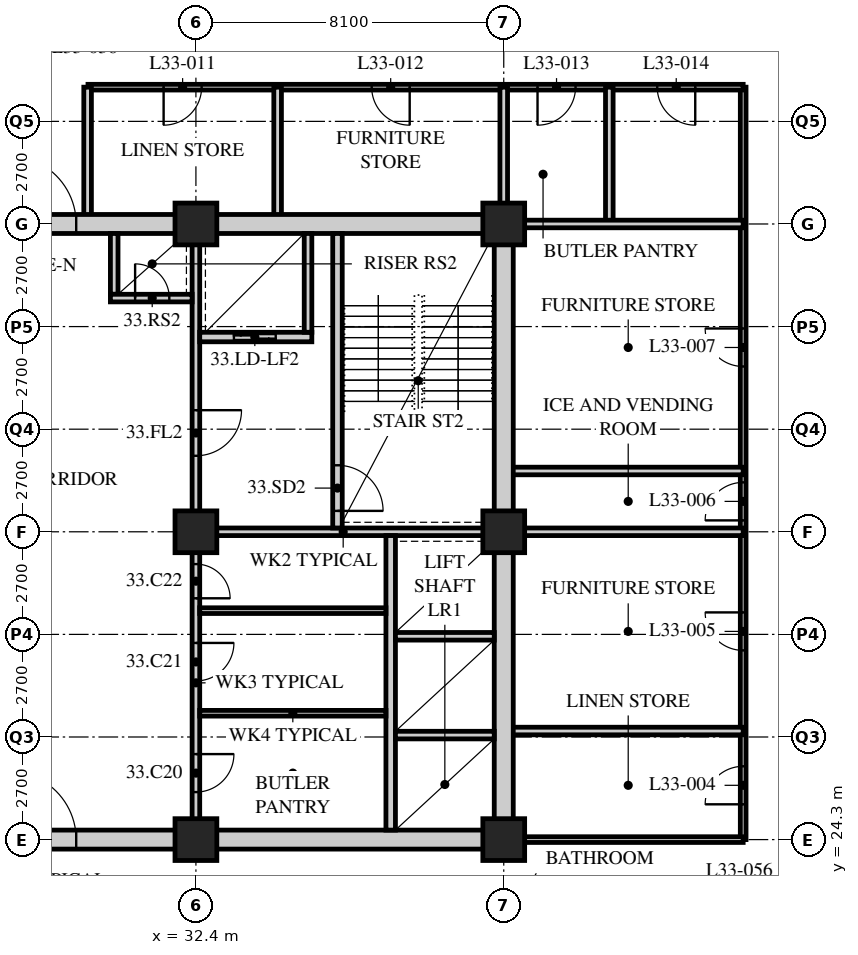
"""IFC4 building model, lengths in metres.
Left out: names, types, materials, properties, quantities, classifications, styles, units other than length and angle.
Written with IfcOpenShell. Run it as: python <this file> out.ifc"""

import sys

from ifc_helpers import new_model, si_unit, direction, frame, frame_2d, origin, origin_2d, place, context, subcontext, project, spatial, rectangle, hollow_rectangle, extrude, element, fill, save


model = new_model("IFC4")
c1 = context("Model", 3, precision=1e-05, world=origin(), true_north=direction((0.0, 1.0)))
c2 = subcontext(c1, "Body", "Model", "MODEL_VIEW")
j1 = project(units=[si_unit("LENGTHUNIT", "METRE"), si_unit("PLANEANGLEUNIT", "RADIAN")], contexts=[c1])
p1 = place(None, origin())
s1 = spatial("IfcSite", under=j1, at=p1, CompositionType="ELEMENT")
p2 = place(p1, origin())
s2 = spatial("IfcBuilding", under=s1, at=p2, CompositionType="ELEMENT")
p3 = place(p2, frame((0.0, 0.0, 130.6)))
s3 = spatial("IfcBuildingStorey", under=s2, at=p3, CompositionType="ELEMENT", Elevation=130.6)
for number, where, z_axis, x_axis in (
    (1, (32.4, 24.3, 0.0), (0.0, 0.0, 1.0), (1.0, 0.0, 0.0)),
    (2, (32.4, 32.4, 0.0), (0.0, 0.0, 1.0), (1.0, 0.0, 0.0)),
    (3, (32.4, 40.5, 0.0), (0.0, 0.0, 1.0), (1.0, 0.0, 0.0)),
    (4, (40.5, 24.3, 0.0), (0.0, 0.0, 1.0), (1.0, 0.0, 0.0)),
    (5, (40.5, 32.4, 0.0), (0.0, 0.0, 1.0), (1.0, 0.0, 0.0)),
    (6, (40.5, 40.5, 0.0), (0.0, 0.0, 1.0), (1.0, 0.0, 0.0)),
):
    element("IfcColumn", number, at=place(p3, frame(where, z_axis=z_axis, x_axis=x_axis)), inside=s3, PredefinedType="COLUMN", context=c2, shape_type="SweptSolid", body=[
        extrude(hollow_rectangle(XDim=1.1, YDim=1.1, WallThickness=0.1, at=origin_2d()), origin(), (0.0, 0.0, 1.0), 3.4),
    ])
p4 = place(p3, frame((46.8, 24.3, 0.0), z_axis=(0.0, 0.0, 1.0), x_axis=(0.0, 1.0, 0.0)))
e7 = element("IfcWall", 7, at=p4, inside=s3, PredefinedType="PARTITIONING", context=c2, shape_type="SweptSolid", body=[
    extrude(rectangle(XDim=19.8, YDim=0.15, at=frame_2d((9.9, 0.0))), origin(), (0.0, 0.0, 1.0), 3.19),
])
p5 = place(p4, frame((0.929, 0.0, 0.0)))
e8 = element("IfcOpeningElement", 8, at=p5, cuts=e7, PredefinedType="OPENING", context=c2, shape_type="SweptSolid", body=[
    extrude(rectangle(XDim=1.0, YDim=2.1, at=frame_2d((0.5, 1.05))), frame((0.0, 0.085, 0.0), z_axis=(0.0, -1.0, 0.0), x_axis=(1.0, 0.0, 0.0)), (0.0, 0.0, 1.0), 0.17),
])
p6 = place(p4, frame((4.979, 0.0, 0.0)))
e9 = element("IfcOpeningElement", 9, at=p6, cuts=e7, PredefinedType="OPENING", context=c2, shape_type="SweptSolid", body=[
    extrude(rectangle(XDim=1.0, YDim=2.1, at=frame_2d((0.5, 1.05))), frame((0.0, 0.085, 0.0), z_axis=(0.0, -1.0, 0.0), x_axis=(1.0, 0.0, 0.0)), (0.0, 0.0, 1.0), 0.17),
])
p7 = place(p4, frame((8.4, 0.0, 0.0)))
e10 = element("IfcOpeningElement", 10, at=p7, cuts=e7, PredefinedType="OPENING", context=c2, shape_type="SweptSolid", body=[
    extrude(rectangle(XDim=1.0, YDim=2.1, at=frame_2d((0.5, 1.05))), frame((0.0, 0.085, 0.0), z_axis=(0.0, -1.0, 0.0), x_axis=(1.0, 0.0, 0.0)), (0.0, 0.0, 1.0), 0.17),
])
p8 = place(p4, frame((12.45, 0.0, 0.0)))
e11 = element("IfcOpeningElement", 11, at=p8, cuts=e7, PredefinedType="OPENING", context=c2, shape_type="SweptSolid", body=[
    extrude(rectangle(XDim=1.0, YDim=2.1, at=frame_2d((0.5, 1.05))), frame((0.0, 0.085, 0.0), z_axis=(0.0, -1.0, 0.0), x_axis=(1.0, 0.0, 0.0)), (0.0, 0.0, 1.0), 0.17),
])
p9 = place(p3, frame((46.8, 44.1, 0.0), z_axis=(0.0, 0.0, 1.0), x_axis=(-1.0, 0.0, 0.0)))
e12 = element("IfcWall", 12, at=p9, inside=s3, PredefinedType="PARTITIONING", context=c2, shape_type="SweptSolid", body=[
    extrude(rectangle(XDim=17.24, YDim=0.15, at=frame_2d((8.62, 0.0))), origin(), (0.0, 0.0, 1.0), 3.19),
])
p10 = place(p9, frame((14.25, 0.0, 0.0)))
e13 = element("IfcOpeningElement", 13, at=p10, cuts=e12, PredefinedType="OPENING", context=c2, shape_type="SweptSolid", body=[
    extrude(rectangle(XDim=1.0, YDim=2.1, at=frame_2d((0.5, 1.05))), frame((0.0, 0.085, 0.0), z_axis=(0.0, -1.0, 0.0), x_axis=(1.0, 0.0, 0.0)), (0.0, 0.0, 1.0), 0.17),
])
p11 = place(p9, frame((8.775, 0.0, 0.0)))
e14 = element("IfcOpeningElement", 14, at=p11, cuts=e12, PredefinedType="OPENING", context=c2, shape_type="SweptSolid", body=[
    extrude(rectangle(XDim=1.0, YDim=2.1, at=frame_2d((0.5, 1.05))), frame((0.0, 0.085, 0.0), z_axis=(0.0, -1.0, 0.0), x_axis=(1.0, 0.0, 0.0)), (0.0, 0.0, 1.0), 0.17),
])
p12 = place(p9, frame((4.411, 0.0, 0.0)))
e15 = element("IfcOpeningElement", 15, at=p12, cuts=e12, PredefinedType="OPENING", context=c2, shape_type="SweptSolid", body=[
    extrude(rectangle(XDim=1.0, YDim=2.1, at=frame_2d((0.5, 1.05))), frame((0.0, 0.085, 0.0), z_axis=(0.0, -1.0, 0.0), x_axis=(1.0, 0.0, 0.0)), (0.0, 0.0, 1.0), 0.17),
])
p13 = place(p9, frame((1.261, 0.0, 0.0)))
e16 = element("IfcOpeningElement", 16, at=p13, cuts=e12, PredefinedType="OPENING", context=c2, shape_type="SweptSolid", body=[
    extrude(rectangle(XDim=1.0, YDim=2.1, at=frame_2d((0.5, 1.05))), frame((0.0, 0.085, 0.0), z_axis=(0.0, -1.0, 0.0), x_axis=(1.0, 0.0, 0.0)), (0.0, 0.0, 1.0), 0.17),
])
p14 = place(p3, frame((40.7, 24.3, 0.0), z_axis=(0.0, 0.0, 1.0), x_axis=(1.0, 0.0, 0.0)))
e17 = element("IfcWall", 17, at=p14, inside=s3, PredefinedType="PARTITIONING", context=c2, shape_type="SweptSolid", body=[
    extrude(rectangle(XDim=6.1, YDim=0.15, at=frame_2d((3.05, 0.0))), origin(), (0.0, 0.0, 1.0), 3.19),
])
for number, where, z_axis, x_axis in (
    (18, (40.5, 32.4, 0.0), (0.0, 0.0, 1.0), (1.0, 0.0, 0.0)),
    (19, (46.8, 27.157, 0.0), (0.0, 0.0, 1.0), (-1.0, 0.0, 0.0)),
    (20, (46.8, 34.0, 0.0), (0.0, 0.0, 1.0), (-1.0, 0.0, 0.0)),
):
    element("IfcWall", number, at=place(p3, frame(where, z_axis=z_axis, x_axis=x_axis)), inside=s3, PredefinedType="SOLIDWALL", context=c2, shape_type="SweptSolid", body=[
        extrude(rectangle(XDim=6.3, YDim=0.2, at=frame_2d((3.15, 0.0))), origin(), (0.0, 0.0, 1.0), 3.19),
    ])
p15 = place(p3, frame((40.5, 40.5, 0.0), z_axis=(0.0, 0.0, 1.0), x_axis=(0.0, 1.0, 0.0)))
e21 = element("IfcWall", 21, at=p15, inside=s3, PredefinedType="SOLIDWALL", context=c2, shape_type="SweptSolid", body=[
    extrude(rectangle(XDim=3.6, YDim=0.2, at=frame_2d((1.8, 0.0))), origin(), (0.0, 0.0, 1.0), 2.578),
])
for number, where, z_axis, x_axis in (
    (22, (34.55, 44.1, 0.0), (0.0, 0.0, 1.0), (0.0, -1.0, 0.0)),
    (23, (43.278, 44.1, 0.0), (0.0, 0.0, 1.0), (0.0, -1.0, 0.0)),
    (24, (29.55, 40.5, 0.0), (0.0, 0.0, 1.0), (0.0, 1.0, 0.0)),
):
    element("IfcWall", number, at=place(p3, frame(where, z_axis=z_axis, x_axis=x_axis)), inside=s3, PredefinedType="SOLIDWALL", context=c2, shape_type="SweptSolid", body=[
        extrude(rectangle(XDim=3.6, YDim=0.2, at=frame_2d((1.8, 0.0))), origin(), (0.0, 0.0, 1.0), 3.19),
    ])
p16 = place(p3, frame((40.5, 40.5, 0.0), z_axis=(0.0, 0.0, 1.0), x_axis=(1.0, 0.0, 0.0)))
e25 = element("IfcWall", 25, at=p16, inside=s3, PredefinedType="SOLIDWALL", context=c2, shape_type="SweptSolid", body=[
    extrude(rectangle(XDim=6.3, YDim=0.2, at=frame_2d((3.15, 0.0))), origin(), (0.0, 0.0, 1.0), 3.19),
])
p17 = place(p3, frame((15.95, 24.3, 0.0), z_axis=(0.0, 0.0, 1.0), x_axis=(1.0, 0.0, 0.0)))
e26 = element("IfcWall", 26, at=p17, inside=s3, PredefinedType="SOLIDWALL", context=c2, shape_type="SweptSolid", body=[
    extrude(rectangle(XDim=24.8, YDim=0.5, at=frame_2d((12.4, 0.0))), origin(), (0.0, 0.0, 1.0), 2.54),
])
p18 = place(p17, frame((11.5, 0.0, 0.0)))
e27 = element("IfcOpeningElement", 27, at=p18, cuts=e26, PredefinedType="OPENING", context=c2, shape_type="SweptSolid", body=[
    extrude(rectangle(XDim=1.8, YDim=2.4, at=frame_2d((0.9, 1.2))), frame((0.0, 0.26, 0.0), z_axis=(0.0, -1.0, 0.0), x_axis=(1.0, 0.0, 0.0)), (0.0, 0.0, 1.0), 0.52),
])
p19 = place(p3, frame((15.95, 40.5, 0.0), z_axis=(0.0, 0.0, 1.0), x_axis=(1.0, 0.0, 0.0)))
e28 = element("IfcWall", 28, at=p19, inside=s3, PredefinedType="SOLIDWALL", context=c2, shape_type="SweptSolid", body=[
    extrude(rectangle(XDim=24.8, YDim=0.5, at=frame_2d((12.4, 0.0))), origin(), (0.0, 0.0, 1.0), 2.54),
])
p20 = place(p19, frame((11.5, 0.0, 0.0)))
e29 = element("IfcOpeningElement", 29, at=p20, cuts=e28, PredefinedType="OPENING", context=c2, shape_type="SweptSolid", body=[
    extrude(rectangle(XDim=1.8, YDim=2.4, at=frame_2d((0.9, 1.2))), frame((0.0, 0.26, 0.0), z_axis=(0.0, -1.0, 0.0), x_axis=(1.0, 0.0, 0.0)), (0.0, 0.0, 1.0), 0.52),
])
p21 = place(p3, frame((40.5, 24.55, 0.0), z_axis=(0.0, 0.0, 1.0), x_axis=(0.0, 1.0, 0.0)))
e30 = element("IfcWall", 30, at=p21, inside=s3, PredefinedType="SOLIDWALL", context=c2, shape_type="SweptSolid", body=[
    extrude(rectangle(XDim=15.7, YDim=0.5, at=frame_2d((7.85, 0.0))), origin(), (0.0, 0.0, 1.0), 2.578),
])
p22 = place(p3, frame((32.3, 32.4, 0.0), z_axis=(0.0, 0.0, 1.0), x_axis=(1.0, 0.0, 0.0)))
e31 = element("IfcWall", 31, at=p22, inside=s3, PredefinedType="SOLIDWALL", context=c2, shape_type="SweptSolid", body=[
    extrude(rectangle(XDim=7.95, YDim=0.2, at=frame_2d((3.975, 0.0))), origin(), (0.0, 0.0, 1.0), 2.578),
])
p23 = place(p3, frame((32.4, 32.5, 0.0), z_axis=(0.0, 0.0, 1.0), x_axis=(0.0, 1.0, 0.0)))
e32 = element("IfcWall", 32, at=p23, inside=s3, PredefinedType="SOLIDWALL", context=c2, shape_type="SweptSolid", body=[
    extrude(rectangle(XDim=7.75, YDim=0.2, at=frame_2d((3.875, 0.0))), origin(), (0.0, 0.0, 1.0), 2.578),
])
p24 = place(p23, frame((1.9, 0.0, 0.0)))
e33 = element("IfcOpeningElement", 33, at=p24, cuts=e32, PredefinedType="OPENING", context=c2, shape_type="SweptSolid", body=[
    extrude(rectangle(XDim=1.2, YDim=2.1, at=frame_2d((0.6, 1.05))), frame((0.0, 0.11, 0.0), z_axis=(0.0, -1.0, 0.0), x_axis=(1.0, 0.0, 0.0)), (0.0, 0.0, 1.0), 0.22),
])
p25 = place(p3, frame((37.525, 24.55, 0.0), z_axis=(0.0, 0.0, 1.0), x_axis=(0.0, 1.0, 0.0)))
e34 = element("IfcWall", 34, at=p25, inside=s3, PredefinedType="SOLIDWALL", context=c2, shape_type="SweptSolid", body=[
    extrude(rectangle(XDim=7.75, YDim=0.25, at=frame_2d((3.875, 0.0))), origin(), (0.0, 0.0, 1.0), 3.19),
])
for number, where, z_axis, x_axis in (
    (35, (37.65, 27.05, 0.0), (0.0, 0.0, 1.0), (1.0, 0.0, 0.0)),
    (36, (37.65, 29.65, 0.0), (0.0, 0.0, 1.0), (1.0, 0.0, 0.0)),
):
    element("IfcWall", number, at=place(p3, frame(where, z_axis=z_axis, x_axis=x_axis)), inside=s3, PredefinedType="SOLIDWALL", context=c2, shape_type="SweptSolid", body=[
        extrude(rectangle(XDim=2.6, YDim=0.2, at=frame_2d((1.3, 0.0))), origin(), (0.0, 0.0, 1.0), 3.19),
    ])
p26 = place(p3, frame((36.125, 32.5, 0.0), z_axis=(0.0, 0.0, 1.0), x_axis=(0.0, 1.0, 0.0)))
e37 = element("IfcWall", 37, at=p26, inside=s3, PredefinedType="SOLIDWALL", context=c2, shape_type="SweptSolid", body=[
    extrude(rectangle(XDim=7.75, YDim=0.25, at=frame_2d((3.875, 0.0))), origin(), (0.0, 0.0, 1.0), 3.19),
])
p27 = place(p26, frame((0.45, 0.0, 0.0)))
e38 = element("IfcOpeningElement", 38, at=p27, cuts=e37, PredefinedType="OPENING", context=c2, shape_type="SweptSolid", body=[
    extrude(rectangle(XDim=1.2, YDim=2.1, at=frame_2d((0.6, 1.05))), frame((0.0, 0.135, 0.0), z_axis=(0.0, -1.0, 0.0), x_axis=(1.0, 0.0, 0.0)), (0.0, 0.0, 1.0), 0.27),
])
p28 = place(p3, frame((32.5, 37.525, 0.0), z_axis=(0.0, 0.0, 1.0), x_axis=(1.0, 0.0, 0.0)))
e39 = element("IfcWall", 39, at=p28, inside=s3, PredefinedType="SOLIDWALL", context=c2, shape_type="SweptSolid", body=[
    extrude(rectangle(XDim=2.95, YDim=0.25, at=frame_2d((1.475, 0.0))), origin(), (0.0, 0.0, 1.0), 3.19),
])
p29 = place(p28, frame((0.9, 0.0, 0.0)))
e40 = element("IfcOpeningElement", 40, at=p29, cuts=e39, PredefinedType="OPENING", context=c2, shape_type="SweptSolid", body=[
    extrude(rectangle(XDim=1.1, YDim=2.4, at=frame_2d((0.55, 1.2))), frame((0.0, 0.135, 0.0), z_axis=(0.0, -1.0, 0.0), x_axis=(1.0, 0.0, 0.0)), (0.0, 0.0, 1.0), 0.27),
])
p30 = place(p3, frame((35.35, 37.65, 0.0), z_axis=(0.0, 0.0, 1.0), x_axis=(0.0, 1.0, 0.0)))
e41 = element("IfcWall", 41, at=p30, inside=s3, PredefinedType="SOLIDWALL", context=c2, shape_type="SweptSolid", body=[
    extrude(rectangle(XDim=2.6, YDim=0.2, at=frame_2d((1.3, 0.0))), origin(), (0.0, 0.0, 1.0), 3.19),
])
p31 = place(p3, frame((30.25, 38.65, 0.0), z_axis=(0.0, 0.0, 1.0), x_axis=(0.0, 1.0, 0.0)))
e42 = element("IfcWall", 42, at=p31, inside=s3, PredefinedType="SOLIDWALL", context=c2, shape_type="SweptSolid", body=[
    extrude(rectangle(XDim=1.6, YDim=0.2, at=frame_2d((0.8, 0.0))), origin(), (0.0, 0.0, 1.0), 3.19),
])
p32 = place(p3, frame((30.15, 38.55, 0.0), z_axis=(0.0, 0.0, 1.0), x_axis=(1.0, 0.0, 0.0)))
e43 = element("IfcWall", 43, at=p32, inside=s3, PredefinedType="SOLIDWALL", context=c2, shape_type="SweptSolid", body=[
    extrude(rectangle(XDim=2.15, YDim=0.2, at=frame_2d((1.075, 0.0))), origin(), (0.0, 0.0, 1.0), 3.19),
])
p33 = place(p32, frame((0.65, 0.0, 0.0)))
e44 = element("IfcOpeningElement", 44, at=p33, cuts=e43, PredefinedType="OPENING", context=c2, shape_type="SweptSolid", body=[
    extrude(rectangle(XDim=0.9, YDim=2.1, at=frame_2d((0.45, 1.05))), frame((0.0, 0.11, 0.0), z_axis=(0.0, -1.0, 0.0), x_axis=(1.0, 0.0, 0.0)), (0.0, 0.0, 1.0), 0.22),
])
p34 = place(p3, frame((32.4, 24.55, 0.0), z_axis=(0.0, 0.0, 1.0), x_axis=(0.0, 1.0, 0.0)))
e45 = element("IfcWall", 45, at=p34, inside=s3, PredefinedType="PARTITIONING", context=c2, shape_type="SweptSolid", body=[
    extrude(rectangle(XDim=7.75, YDim=0.2, at=frame_2d((3.875, 0.0))), origin(), (0.0, 0.0, 1.0), 2.578),
])
p35 = place(p34, frame((1.0, 0.0, 0.0)))
e46 = element("IfcOpeningElement", 46, at=p35, cuts=e45, PredefinedType="OPENING", context=c2, shape_type="SweptSolid", body=[
    extrude(rectangle(XDim=1.0, YDim=2.1, at=frame_2d((0.5, 1.05))), frame((0.0, 0.11, 0.0), z_axis=(0.0, -1.0, 0.0), x_axis=(1.0, 0.0, 0.0)), (0.0, 0.0, 1.0), 0.22),
])
p36 = place(p34, frame((3.925, 0.0, 0.0)))
e47 = element("IfcOpeningElement", 47, at=p36, cuts=e45, PredefinedType="OPENING", context=c2, shape_type="SweptSolid", body=[
    extrude(rectangle(XDim=1.0, YDim=2.1, at=frame_2d((0.5, 1.05))), frame((0.0, 0.11, 0.0), z_axis=(0.0, -1.0, 0.0), x_axis=(1.0, 0.0, 0.0)), (0.0, 0.0, 1.0), 0.22),
])
p37 = place(p34, frame((6.1, 0.0, 0.0)))
e48 = element("IfcOpeningElement", 48, at=p37, cuts=e45, PredefinedType="OPENING", context=c2, shape_type="SweptSolid", body=[
    extrude(rectangle(XDim=0.9, YDim=2.1, at=frame_2d((0.45, 1.05))), frame((0.0, 0.11, 0.0), z_axis=(0.0, -1.0, 0.0), x_axis=(1.0, 0.0, 0.0)), (0.0, 0.0, 1.0), 0.22),
])
for number, where, z_axis, x_axis in (
    (49, (32.5, 27.625, 0.0), (0.0, 0.0, 1.0), (1.0, 0.0, 0.0)),
    (50, (32.5, 30.325, 0.0), (0.0, 0.0, 1.0), (1.0, 0.0, 0.0)),
):
    element("IfcWall", number, at=place(p3, frame(where, z_axis=z_axis, x_axis=x_axis)), inside=s3, PredefinedType="PARTITIONING", context=c2, shape_type="SweptSolid", body=[
        extrude(rectangle(XDim=4.9, YDim=0.15, at=frame_2d((2.45, 0.0))), origin(), (0.0, 0.0, 1.0), 3.19),
    ])
p38 = place(p5, origin())
e51 = element("IfcDoor", 51, at=p38, inside=s3, OperationType="SINGLE_SWING_LEFT", PredefinedType="DOOR", context=c2, shape_type="SweptSolid", body=[
    extrude(rectangle(XDim=1.0, YDim=2.1, at=frame_2d((0.5, 1.05))), frame((0.0, 0.025, 0.0), z_axis=(0.0, -1.0, 0.0), x_axis=(1.0, 0.0, 0.0)), (0.0, 0.0, 1.0), 0.05),
])
fill(e8, e51)
p39 = place(p6, origin())
e52 = element("IfcDoor", 52, at=p39, inside=s3, OperationType="SINGLE_SWING_RIGHT", PredefinedType="DOOR", context=c2, shape_type="SweptSolid", body=[
    extrude(rectangle(XDim=1.0, YDim=2.1, at=frame_2d((0.5, 1.05))), frame((0.0, 0.025, 0.0), z_axis=(0.0, -1.0, 0.0), x_axis=(1.0, 0.0, 0.0)), (0.0, 0.0, 1.0), 0.05),
])
fill(e9, e52)
p40 = place(p7, origin())
e53 = element("IfcDoor", 53, at=p40, inside=s3, OperationType="SINGLE_SWING_LEFT", PredefinedType="DOOR", context=c2, shape_type="SweptSolid", body=[
    extrude(rectangle(XDim=1.0, YDim=2.1, at=frame_2d((0.5, 1.05))), frame((0.0, 0.025, 0.0), z_axis=(0.0, -1.0, 0.0), x_axis=(1.0, 0.0, 0.0)), (0.0, 0.0, 1.0), 0.05),
])
fill(e10, e53)
p41 = place(p8, origin())
e54 = element("IfcDoor", 54, at=p41, inside=s3, OperationType="SINGLE_SWING_RIGHT", PredefinedType="DOOR", context=c2, shape_type="SweptSolid", body=[
    extrude(rectangle(XDim=1.0, YDim=2.1, at=frame_2d((0.5, 1.05))), frame((0.0, 0.025, 0.0), z_axis=(0.0, -1.0, 0.0), x_axis=(1.0, 0.0, 0.0)), (0.0, 0.0, 1.0), 0.05),
])
fill(e11, e54)
p42 = place(p10, origin())
e55 = element("IfcDoor", 55, at=p42, inside=s3, OperationType="SINGLE_SWING_RIGHT", PredefinedType="DOOR", context=c2, shape_type="SweptSolid", body=[
    extrude(rectangle(XDim=1.0, YDim=2.1, at=frame_2d((0.5, 1.05))), frame((0.0, 0.025, 0.0), z_axis=(0.0, -1.0, 0.0), x_axis=(1.0, 0.0, 0.0)), (0.0, 0.0, 1.0), 0.05),
])
fill(e13, e55)
p43 = place(p11, origin())
e56 = element("IfcDoor", 56, at=p43, inside=s3, OperationType="SINGLE_SWING_LEFT", PredefinedType="DOOR", context=c2, shape_type="SweptSolid", body=[
    extrude(rectangle(XDim=1.0, YDim=2.1, at=frame_2d((0.5, 1.05))), frame((0.0, 0.025, 0.0), z_axis=(0.0, -1.0, 0.0), x_axis=(1.0, 0.0, 0.0)), (0.0, 0.0, 1.0), 0.05),
])
fill(e14, e56)
p44 = place(p12, origin())
e57 = element("IfcDoor", 57, at=p44, inside=s3, OperationType="SINGLE_SWING_RIGHT", PredefinedType="DOOR", context=c2, shape_type="SweptSolid", body=[
    extrude(rectangle(XDim=1.0, YDim=2.1, at=frame_2d((0.5, 1.05))), frame((0.0, 0.025, 0.0), z_axis=(0.0, -1.0, 0.0), x_axis=(1.0, 0.0, 0.0)), (0.0, 0.0, 1.0), 0.05),
])
fill(e15, e57)
p45 = place(p13, origin())
e58 = element("IfcDoor", 58, at=p45, inside=s3, OperationType="SINGLE_SWING_LEFT", PredefinedType="DOOR", context=c2, shape_type="SweptSolid", body=[
    extrude(rectangle(XDim=1.0, YDim=2.1, at=frame_2d((0.5, 1.05))), frame((0.0, 0.025, 0.0), z_axis=(0.0, -1.0, 0.0), x_axis=(1.0, 0.0, 0.0)), (0.0, 0.0, 1.0), 0.05),
])
fill(e16, e58)
p46 = place(p35, origin())
e59 = element("IfcDoor", 59, at=p46, inside=s3, OperationType="SINGLE_SWING_LEFT", PredefinedType="DOOR", context=c2, shape_type="SweptSolid", body=[
    extrude(rectangle(XDim=1.0, YDim=2.1, at=frame_2d((0.5, 1.05))), frame((0.0, 0.025, 0.0), z_axis=(0.0, -1.0, 0.0), x_axis=(1.0, 0.0, 0.0)), (0.0, 0.0, 1.0), 0.05),
])
fill(e46, e59)
p47 = place(p36, origin())
e60 = element("IfcDoor", 60, at=p47, inside=s3, OperationType="SINGLE_SWING_LEFT", PredefinedType="DOOR", context=c2, shape_type="SweptSolid", body=[
    extrude(rectangle(XDim=1.0, YDim=2.1, at=frame_2d((0.5, 1.05))), frame((0.0, 0.025, 0.0), z_axis=(0.0, -1.0, 0.0), x_axis=(1.0, 0.0, 0.0)), (0.0, 0.0, 1.0), 0.05),
])
fill(e47, e60)
p48 = place(p37, origin())
e61 = element("IfcDoor", 61, at=p48, inside=s3, OperationType="SINGLE_SWING_RIGHT", PredefinedType="DOOR", context=c2, shape_type="SweptSolid", body=[
    extrude(rectangle(XDim=0.9, YDim=2.1, at=frame_2d((0.45, 1.05))), frame((0.0, 0.025, 0.0), z_axis=(0.0, -1.0, 0.0), x_axis=(1.0, 0.0, 0.0)), (0.0, 0.0, 1.0), 0.05),
])
fill(e48, e61)
p49 = place(p27, origin())
e62 = element("IfcDoor", 62, at=p49, inside=s3, OperationType="SINGLE_SWING_RIGHT", PredefinedType="DOOR", context=c2, shape_type="SweptSolid", body=[
    extrude(rectangle(XDim=1.2, YDim=2.1, at=frame_2d((0.6, 1.05))), frame((0.0, 0.025, 0.0), z_axis=(0.0, -1.0, 0.0), x_axis=(1.0, 0.0, 0.0)), (0.0, 0.0, 1.0), 0.05),
])
fill(e38, e62)
p50 = place(p24, origin())
e63 = element("IfcDoor", 63, at=p50, inside=s3, OperationType="SINGLE_SWING_LEFT", PredefinedType="DOOR", context=c2, shape_type="SweptSolid", body=[
    extrude(rectangle(XDim=1.2, YDim=2.1, at=frame_2d((0.6, 1.05))), frame((0.0, 0.025, 0.0), z_axis=(0.0, -1.0, 0.0), x_axis=(1.0, 0.0, 0.0)), (0.0, 0.0, 1.0), 0.05),
])
fill(e33, e63)
p51 = place(p33, origin())
e64 = element("IfcDoor", 64, at=p51, inside=s3, OperationType="SINGLE_SWING_LEFT", PredefinedType="DOOR", context=c2, shape_type="SweptSolid", body=[
    extrude(rectangle(XDim=0.9, YDim=2.1, at=frame_2d((0.45, 1.05))), frame((0.0, 0.025, 0.0), z_axis=(0.0, -1.0, 0.0), x_axis=(1.0, 0.0, 0.0)), (0.0, 0.0, 1.0), 0.05),
])
fill(e44, e64)
p52 = place(p29, origin())
e65 = element("IfcDoor", 65, at=p52, inside=s3, OperationType="DOUBLE_DOOR_SLIDING", PredefinedType="DOOR", context=c2, shape_type="SweptSolid", body=[
    extrude(rectangle(XDim=1.1, YDim=2.4, at=frame_2d((0.55, 1.2))), frame((0.0, 0.025, 0.0), z_axis=(0.0, -1.0, 0.0), x_axis=(1.0, 0.0, 0.0)), (0.0, 0.0, 1.0), 0.05),
])
fill(e40, e65)
p53 = place(p18, origin())
e66 = element("IfcDoor", 66, at=p53, inside=s3, OperationType="DOUBLE_DOOR_SINGLE_SWING", PredefinedType="DOOR", context=c2, shape_type="SweptSolid", body=[
    extrude(rectangle(XDim=1.8, YDim=2.4, at=frame_2d((0.9, 1.2))), frame((0.0, 0.025, 0.0), z_axis=(0.0, -1.0, 0.0), x_axis=(1.0, 0.0, 0.0)), (0.0, 0.0, 1.0), 0.05),
])
fill(e27, e66)
p54 = place(p20, origin())
e67 = element("IfcDoor", 67, at=p54, inside=s3, OperationType="DOUBLE_DOOR_SINGLE_SWING", PredefinedType="DOOR", context=c2, shape_type="SweptSolid", body=[
    extrude(rectangle(XDim=1.8, YDim=2.4, at=frame_2d((0.9, 1.2))), frame((0.0, 0.025, 0.0), z_axis=(0.0, -1.0, 0.0), x_axis=(1.0, 0.0, 0.0)), (0.0, 0.0, 1.0), 0.05),
])
fill(e29, e67)
save(model, sys.argv[1])
